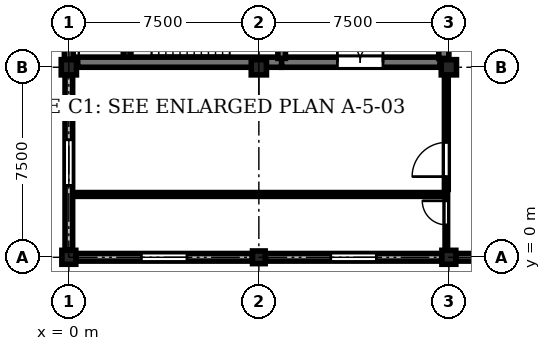
"""IFC4 building model, lengths in metres.
Left out: names, types, materials, properties, quantities, classifications, styles, units other than length and angle.
Written with IfcOpenShell. Run it as: python <this file> out.ifc"""

import sys

from ifc_helpers import new_model, si_unit, direction, frame, frame_2d, origin, origin_with_axes, origin_2d, place, context, subcontext, project, spatial, rectangle, circle, i_section, extrude, element, fill, save


model = new_model("IFC4")
c1 = context("Model", 3, precision=1e-05, world=origin(), true_north=direction((0.0, 1.0)))
c2 = subcontext(c1, "Body", "Model", "MODEL_VIEW")
j1 = project(units=[si_unit("LENGTHUNIT", "METRE"), si_unit("PLANEANGLEUNIT", "RADIAN")], contexts=[c1])
p1 = place(None, origin())
s1 = spatial("IfcSite", under=j1, at=p1, CompositionType="ELEMENT")
p2 = place(p1, origin())
s2 = spatial("IfcBuilding", under=s1, at=p2, CompositionType="ELEMENT")
p3 = place(p2, frame((0.0, 0.0, 21.9)))
s3 = spatial("IfcBuildingStorey", under=s2, at=p3, CompositionType="ELEMENT", Elevation=21.9)
p4 = place(p3, origin_with_axes())
e1 = element("IfcColumn", 1, at=p4, inside=s3, PredefinedType="COLUMN", context=c2, shape_type="SweptSolid", body=[
    extrude(rectangle(XDim=0.55, YDim=0.55, at=origin_2d()), origin(), (0.0, 0.0, 1.0), 4.05),
])
p5 = place(p3, frame((0.0, 7.5, 0.0), z_axis=(0.0, 0.0, 1.0), x_axis=(1.0, 0.0, 0.0)))
e2 = element("IfcColumn", 2, at=p5, inside=s3, PredefinedType="COLUMN", context=c2, shape_type="SweptSolid", body=[
    extrude(rectangle(XDim=0.6, YDim=0.6, at=origin_2d()), origin(), (0.0, 0.0, 1.0), 4.05),
])
p6 = place(p3, frame((7.5, 0.0, 0.0), z_axis=(0.0, 0.0, 1.0), x_axis=(1.0, 0.0, 0.0)))
e3 = element("IfcColumn", 3, at=p6, inside=s3, PredefinedType="COLUMN", context=c2, shape_type="SweptSolid", body=[
    extrude(rectangle(XDim=0.5, YDim=0.5, at=origin_2d()), origin(), (0.0, 0.0, 1.0), 4.05),
])
p7 = place(p3, frame((7.5, 7.5, 0.0), z_axis=(0.0, 0.0, 1.0), x_axis=(1.0, 0.0, 0.0)))
e4 = element("IfcColumn", 4, at=p7, inside=s3, PredefinedType="COLUMN", context=c2, shape_type="SweptSolid", body=[
    extrude(rectangle(XDim=0.6, YDim=0.6, at=origin_2d()), origin(), (0.0, 0.0, 1.0), 4.05),
])
p8 = place(p3, frame((15.0, 0.0, 0.0), z_axis=(0.0, 0.0, 1.0), x_axis=(1.0, 0.0, 0.0)))
e5 = element("IfcColumn", 5, at=p8, inside=s3, PredefinedType="COLUMN", context=c2, shape_type="SweptSolid", body=[
    extrude(rectangle(XDim=0.55, YDim=0.55, at=origin_2d()), origin(), (0.0, 0.0, 1.0), 4.05),
])
p9 = place(p3, frame((15.0, 7.5, 0.0), z_axis=(0.0, 0.0, 1.0), x_axis=(1.0, 0.0, 0.0)))
e6 = element("IfcColumn", 6, at=p9, inside=s3, PredefinedType="COLUMN", context=c2, shape_type="SweptSolid", body=[
    extrude(circle(Radius=0.3, at=origin_2d()), origin(), (0.0, 0.0, 1.0), 4.05),
])
p10 = place(p3, frame((2.3, 8.05, 0.0), z_axis=(0.0, 0.0, 1.0), x_axis=(1.0, 0.0, 0.0)))
e7 = element("IfcColumn", 7, at=p10, inside=s3, PredefinedType="COLUMN", context=c2, shape_type="SweptSolid", body=[
    extrude(i_section(OverallWidth=0.3, OverallDepth=0.3, WebThickness=0.011, FlangeThickness=0.019, FilletRadius=0.027, at=origin_2d()), origin(), (0.0, 0.0, 1.0), 4.05),
])
p11 = place(p3, frame((7.24, 0.0, 0.0), z_axis=(0.0, 0.0, 1.0), x_axis=(-1.0, 0.0, 0.0)))
e8 = element("IfcWall", 8, at=p11, inside=s3, PredefinedType="STANDARD", context=c2, shape_type="SweptSolid", body=[
    extrude(rectangle(XDim=6.955, YDim=0.3, at=frame_2d((3.478, 0.0))), origin(), (0.0, 0.0, 1.0), 3.17),
])
p12 = place(p11, frame((2.577, 0.0, 0.9)))
e9 = element("IfcOpeningElement", 9, at=p12, cuts=e8, PredefinedType="OPENING", context=c2, shape_type="SweptSolid", body=[
    extrude(rectangle(XDim=1.8, YDim=1.8, at=frame_2d((0.9, 0.9))), frame((0.0, 0.16, 0.0), z_axis=(0.0, -1.0, 0.0), x_axis=(1.0, 0.0, 0.0)), (0.0, 0.0, 1.0), 0.32),
])
p13 = place(p3, frame((0.0, 0.285, 0.0), z_axis=(0.0, 0.0, 1.0), x_axis=(0.0, 1.0, 0.0)))
e10 = element("IfcWall", 10, at=p13, inside=s3, PredefinedType="STANDARD", context=c2, shape_type="SweptSolid", body=[
    extrude(rectangle(XDim=6.905, YDim=0.3, at=frame_2d((3.453, 0.0))), origin(), (0.0, 0.0, 1.0), 3.17),
])
p14 = place(p13, frame((2.552, 0.0, 0.9)))
e11 = element("IfcOpeningElement", 11, at=p14, cuts=e10, PredefinedType="OPENING", context=c2, shape_type="SweptSolid", body=[
    extrude(rectangle(XDim=1.8, YDim=1.8, at=frame_2d((0.9, 0.9))), frame((0.0, 0.16, 0.0), z_axis=(0.0, -1.0, 0.0), x_axis=(1.0, 0.0, 0.0)), (0.0, 0.0, 1.0), 0.32),
])
p15 = place(p3, frame((0.0, 7.81, 0.0), z_axis=(0.0, 0.0, 1.0), x_axis=(0.0, 1.0, 0.0)))
e12 = element("IfcWall", 12, at=p15, inside=s3, PredefinedType="SHEAR", context=c2, shape_type="SweptSolid", body=[
    extrude(rectangle(XDim=6.88, YDim=0.35, at=frame_2d((3.44, 0.0))), origin(), (0.0, 0.0, 1.0), 3.77),
])
p16 = place(p3, frame((14.715, 0.0, 0.0), z_axis=(0.0, 0.0, 1.0), x_axis=(-1.0, 0.0, 0.0)))
e13 = element("IfcWall", 13, at=p16, inside=s3, PredefinedType="STANDARD", context=c2, shape_type="SweptSolid", body=[
    extrude(rectangle(XDim=6.955, YDim=0.3, at=frame_2d((3.478, 0.0))), origin(), (0.0, 0.0, 1.0), 3.17),
])
p17 = place(p16, frame((2.577, 0.0, 0.9)))
e14 = element("IfcOpeningElement", 14, at=p17, cuts=e13, PredefinedType="OPENING", context=c2, shape_type="SweptSolid", body=[
    extrude(rectangle(XDim=1.8, YDim=1.99, at=frame_2d((0.9, 0.995))), frame((0.0, 0.16, 0.0), z_axis=(0.0, -1.0, 0.0), x_axis=(1.0, 0.0, 0.0)), (0.0, 0.0, 1.0), 0.32),
])
p18 = place(p3, frame((22.24, 0.0, 0.0), z_axis=(0.0, 0.0, 1.0), x_axis=(-1.0, 0.0, 0.0)))
e15 = element("IfcWall", 15, at=p18, inside=s3, PredefinedType="STANDARD", context=c2, shape_type="SweptSolid", body=[
    extrude(rectangle(XDim=6.955, YDim=0.3, at=frame_2d((3.478, 0.0))), origin(), (0.0, 0.0, 1.0), 3.17),
])
p19 = place(p18, frame((2.728, 0.0, 0.9)))
e16 = element("IfcOpeningElement", 16, at=p19, cuts=e15, PredefinedType="OPENING", context=c2, shape_type="SweptSolid", body=[
    extrude(rectangle(XDim=1.5, YDim=1.99, at=frame_2d((0.75, 0.995))), frame((0.0, 0.16, 0.0), z_axis=(0.0, -1.0, 0.0), x_axis=(1.0, 0.0, 0.0)), (0.0, 0.0, 1.0), 0.32),
])
p20 = place(p3, frame((0.35, 7.7, 0.0), z_axis=(0.0, 0.0, 1.0), x_axis=(1.0, 0.0, 0.0)))
e17 = element("IfcWall", 17, at=p20, inside=s3, PredefinedType="SHEAR", context=c2, shape_type="SweptSolid", body=[
    extrude(rectangle(XDim=8.05, YDim=0.4, at=frame_2d((4.025, 0.0))), origin(), (0.0, 0.0, 1.0), 3.77),
])
p21 = place(p3, frame((8.4, 7.7, 0.0), z_axis=(0.0, 0.0, 1.0), x_axis=(1.0, 0.0, 0.0)))
e18 = element("IfcWall", 18, at=p21, inside=s3, PredefinedType="SHEAR", context=c2, shape_type="SweptSolid", body=[
    extrude(rectangle(XDim=6.25, YDim=0.4, at=frame_2d((3.125, 0.0))), origin(), (0.0, 0.0, 1.0), 3.77),
])
p22 = place(p21, frame((2.2, 0.0, 0.0)))
e19 = element("IfcOpeningElement", 19, at=p22, cuts=e18, PredefinedType="OPENING", context=c2, shape_type="SweptSolid", body=[
    extrude(rectangle(XDim=1.8, YDim=2.25, at=frame_2d((0.9, 1.125))), frame((0.0, 0.21, 0.0), z_axis=(0.0, -1.0, 0.0), x_axis=(1.0, 0.0, 0.0)), (0.0, 0.0, 1.0), 0.42),
])
p23 = place(p3, frame((14.8, 7.85, 0.0), z_axis=(0.0, 0.0, 1.0), x_axis=(0.0, 1.0, 0.0)))
e20 = element("IfcWall", 20, at=p23, inside=s3, PredefinedType="SHEAR", context=c2, shape_type="SweptSolid", body=[
    extrude(rectangle(XDim=3.75, YDim=0.4, at=frame_2d((1.875, 0.0))), origin(), (0.0, 0.0, 1.0), 3.77),
])
p24 = place(p3, frame((8.4, 11.5, 0.0), z_axis=(0.0, 0.0, 1.0), x_axis=(0.0, -1.0, 0.0)))
e21 = element("IfcWall", 21, at=p24, inside=s3, PredefinedType="SHEAR", context=c2, shape_type="SweptSolid", body=[
    extrude(rectangle(XDim=3.65, YDim=0.3, at=frame_2d((1.825, 0.0))), origin(), (0.0, 0.0, 1.0), 3.77),
])
p25 = place(p24, frame((1.22, 0.0, 0.0)))
e22 = element("IfcOpeningElement", 22, at=p25, cuts=e21, PredefinedType="OPENING", context=c2, shape_type="SweptSolid", body=[
    extrude(rectangle(XDim=1.2, YDim=2.25, at=frame_2d((0.6, 1.125))), frame((0.0, 0.16, 0.0), z_axis=(0.0, -1.0, 0.0), x_axis=(1.0, 0.0, 0.0)), (0.0, 0.0, 1.0), 0.32),
])
p26 = place(p3, frame((14.9, 0.43, 0.0), z_axis=(0.0, 0.0, 1.0), x_axis=(0.0, 1.0, 0.0)))
e23 = element("IfcWall", 23, at=p26, inside=s3, PredefinedType="PARTITIONING", context=c2, shape_type="SweptSolid", body=[
    extrude(rectangle(XDim=2.05, YDim=0.1, at=frame_2d((1.025, 0.0))), origin(), (0.0, 0.0, 1.0), 3.205),
])
p27 = place(p26, frame((0.85, 0.0, 0.0)))
e24 = element("IfcOpeningElement", 24, at=p27, cuts=e23, PredefinedType="OPENING", context=c2, shape_type="SweptSolid", body=[
    extrude(rectangle(XDim=0.95, YDim=2.15, at=frame_2d((0.475, 1.075))), frame((0.0, 0.06, 0.0), z_axis=(0.0, -1.0, 0.0), x_axis=(1.0, 0.0, 0.0)), (0.0, 0.0, 1.0), 0.12),
])
p28 = place(p3, frame((14.9, 2.68, 0.0), z_axis=(0.0, 0.0, 1.0), x_axis=(0.0, 1.0, 0.0)))
e25 = element("IfcWall", 25, at=p28, inside=s3, PredefinedType="PARTITIONING", context=c2, shape_type="SweptSolid", body=[
    extrude(rectangle(XDim=4.39, YDim=0.15, at=frame_2d((2.195, 0.0))), origin(), (0.0, 0.0, 1.0), 3.205),
])
p29 = place(p28, frame((0.504, 0.0, 0.0)))
e26 = element("IfcOpeningElement", 26, at=p29, cuts=e25, PredefinedType="OPENING", context=c2, shape_type="SweptSolid", body=[
    extrude(rectangle(XDim=1.35, YDim=2.25, at=frame_2d((0.675, 1.125))), frame((0.0, 0.085, 0.0), z_axis=(0.0, -1.0, 0.0), x_axis=(1.0, 0.0, 0.0)), (0.0, 0.0, 1.0), 0.17),
])
p30 = place(p3, frame((0.35, 2.48, 0.0), z_axis=(0.0, 0.0, 1.0), x_axis=(1.0, 0.0, 0.0)))
e27 = element("IfcWall", 27, at=p30, inside=s3, PredefinedType="PARTITIONING", context=c2, shape_type="SweptSolid", body=[
    extrude(rectangle(XDim=14.55, YDim=0.15, at=frame_2d((7.275, 0.0))), origin(), (0.0, 0.0, 1.0), 3.755),
])
p31 = place(p12, origin())
e28 = element("IfcWindow", 28, at=p31, inside=s3, PartitioningType="SINGLE_PANEL", PredefinedType="WINDOW", context=c2, shape_type="SweptSolid", body=[
    extrude(rectangle(XDim=1.8, YDim=1.8, at=frame_2d((0.9, 0.9))), frame((0.0, 0.03, 0.0), z_axis=(0.0, -1.0, 0.0), x_axis=(1.0, 0.0, 0.0)), (0.0, 0.0, 1.0), 0.06),
])
fill(e9, e28)
p32 = place(p14, origin())
e29 = element("IfcWindow", 29, at=p32, inside=s3, PartitioningType="SINGLE_PANEL", PredefinedType="WINDOW", context=c2, shape_type="SweptSolid", body=[
    extrude(rectangle(XDim=1.8, YDim=1.8, at=frame_2d((0.9, 0.9))), frame((0.0, 0.03, 0.0), z_axis=(0.0, -1.0, 0.0), x_axis=(1.0, 0.0, 0.0)), (0.0, 0.0, 1.0), 0.06),
])
fill(e11, e29)
p33 = place(p17, origin())
e30 = element("IfcWindow", 30, at=p33, inside=s3, PartitioningType="SINGLE_PANEL", PredefinedType="WINDOW", context=c2, shape_type="SweptSolid", body=[
    extrude(rectangle(XDim=1.8, YDim=1.99, at=frame_2d((0.9, 0.995))), frame((0.0, 0.03, 0.0), z_axis=(0.0, -1.0, 0.0), x_axis=(1.0, 0.0, 0.0)), (0.0, 0.0, 1.0), 0.06),
])
fill(e14, e30)
p34 = place(p22, origin())
e31 = element("IfcDoor", 31, at=p34, inside=s3, OperationType="DOUBLE_DOOR_SINGLE_SWING", PredefinedType="DOOR", context=c2, shape_type="SweptSolid", body=[
    extrude(rectangle(XDim=1.8, YDim=2.25, at=frame_2d((0.9, 1.125))), frame((0.0, 0.025, 0.0), z_axis=(0.0, -1.0, 0.0), x_axis=(1.0, 0.0, 0.0)), (0.0, 0.0, 1.0), 0.05),
])
fill(e19, e31)
p35 = place(p27, origin())
e32 = element("IfcDoor", 32, at=p35, inside=s3, OperationType="SINGLE_SWING_RIGHT", PredefinedType="DOOR", context=c2, shape_type="SweptSolid", body=[
    extrude(rectangle(XDim=0.95, YDim=2.15, at=frame_2d((0.475, 1.075))), frame((0.0, 0.025, 0.0), z_axis=(0.0, -1.0, 0.0), x_axis=(1.0, 0.0, 0.0)), (0.0, 0.0, 1.0), 0.05),
])
fill(e24, e32)
p36 = place(p29, origin())
e33 = element("IfcDoor", 33, at=p36, inside=s3, OperationType="SINGLE_SWING_LEFT", PredefinedType="DOOR", context=c2, shape_type="SweptSolid", body=[
    extrude(rectangle(XDim=1.35, YDim=2.25, at=frame_2d((0.675, 1.125))), frame((0.0, 0.025, 0.0), z_axis=(0.0, -1.0, 0.0), x_axis=(1.0, 0.0, 0.0)), (0.0, 0.0, 1.0), 0.05),
])
fill(e26, e33)
save(model, sys.argv[1])
